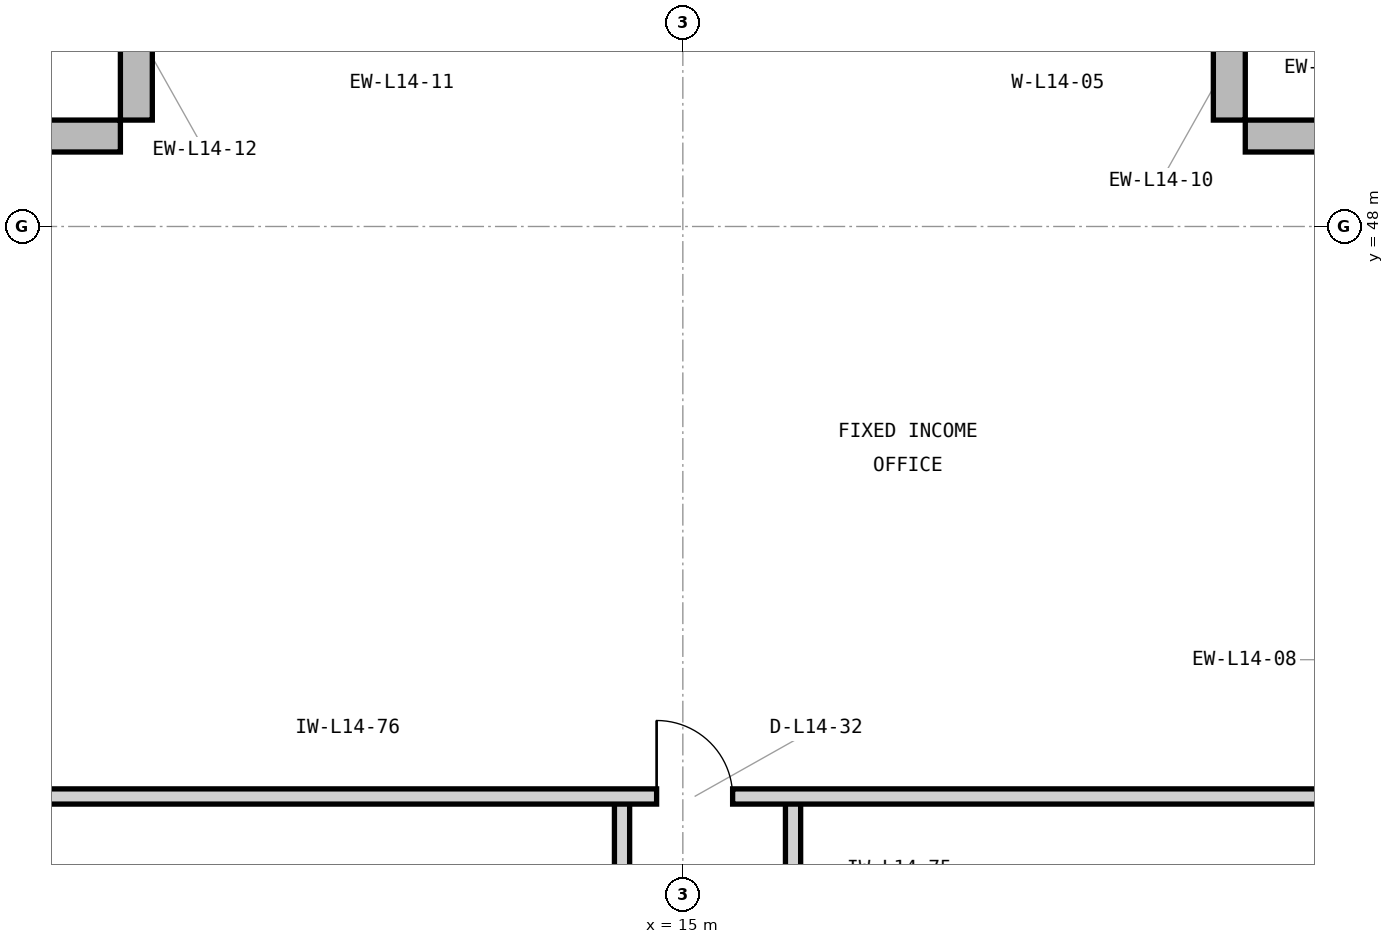
"""IFC4 building model, lengths in metres.
Left out: names, types, materials, properties, quantities, classifications, styles, units other than length and angle.
Written with IfcOpenShell. Run it as: python <this file> out.ifc"""

import sys

from ifc_helpers import new_model, si_unit, direction, frame, frame_2d, origin, place, context, subcontext, project, spatial, rectangle, extrude, element, fill, save


model = new_model("IFC4")
c1 = context("Model", 3, precision=1e-05, world=origin(), true_north=direction((0.0, 1.0)))
c2 = subcontext(c1, "Body", "Model", "MODEL_VIEW")
j1 = project(units=[si_unit("LENGTHUNIT", "METRE"), si_unit("PLANEANGLEUNIT", "RADIAN")], contexts=[c1])
p1 = place(None, origin())
s1 = spatial("IfcSite", under=j1, at=p1, CompositionType="ELEMENT")
p2 = place(p1, origin())
s2 = spatial("IfcBuilding", under=s1, at=p2, CompositionType="ELEMENT")
p3 = place(p2, frame((0.0, 0.0, 63.6)))
s3 = spatial("IfcBuildingStorey", under=s2, at=p3, CompositionType="ELEMENT", Elevation=63.6)
for number, where, z_axis, x_axis in (
    (1, (24.0, 49.19, 0.0), (0.0, 0.0, 1.0), (-1.0, 0.0, 0.0)),
    (2, (22.19, 49.4, 0.0), (0.0, 0.0, 1.0), (0.0, 1.0, 0.0)),
    (3, (7.81, 51.0, 0.0), (0.0, 0.0, 1.0), (0.0, -1.0, 0.0)),
    (4, (7.6, 49.19, 0.0), (0.0, 0.0, 1.0), (-1.0, 0.0, 0.0)),
):
    element("IfcWall", number, at=place(p3, frame(where, z_axis=z_axis, x_axis=x_axis)), inside=s3, PredefinedType="STANDARD", context=c2, shape_type="SweptSolid", body=[
        extrude(rectangle(XDim=1.6, YDim=0.42, at=frame_2d((0.8, 0.0))), origin(), (0.0, 0.0, 1.0), 3.98),
    ])
p4 = place(p3, frame((14.2, 29.18, 0.0), z_axis=(0.0, 0.0, 1.0), x_axis=(0.0, 1.0, 0.0)))
e5 = element("IfcWall", 5, at=p4, inside=s3, PredefinedType="PARTITIONING", context=c2, shape_type="SweptSolid", body=[
    extrude(rectangle(XDim=11.32, YDim=0.2, at=frame_2d((5.66, 0.0))), origin(), (0.0, 0.0, 1.0), 3.97),
])
p5 = place(p4, frame((5.16, 0.0, 0.0)))
e6 = element("IfcOpeningElement", 6, at=p5, cuts=e5, PredefinedType="OPENING", context=c2, shape_type="SweptSolid", body=[
    extrude(rectangle(XDim=1.0, YDim=2.15, at=frame_2d((0.5, 1.075))), frame((0.0, 0.11, 0.0), z_axis=(0.0, -1.0, 0.0), x_axis=(1.0, 0.0, 0.0)), (0.0, 0.0, 1.0), 0.22),
])
p6 = place(p3, frame((16.45, 36.68, 0.0), z_axis=(0.0, 0.0, 1.0), x_axis=(0.0, 1.0, 0.0)))
e7 = element("IfcWall", 7, at=p6, inside=s3, PredefinedType="PARTITIONING", context=c2, shape_type="SweptSolid", body=[
    extrude(rectangle(XDim=3.82, YDim=0.2, at=frame_2d((1.91, 0.0))), origin(), (0.0, 0.0, 1.0), 3.97),
])
p7 = place(p6, frame((1.41, 0.0, 0.0)))
e8 = element("IfcOpeningElement", 8, at=p7, cuts=e7, PredefinedType="OPENING", context=c2, shape_type="SweptSolid", body=[
    extrude(rectangle(XDim=1.0, YDim=2.15, at=frame_2d((0.5, 1.075))), frame((0.0, 0.11, 0.0), z_axis=(0.0, -1.0, 0.0), x_axis=(1.0, 0.0, 0.0)), (0.0, 0.0, 1.0), 0.22),
])
p8 = place(p3, frame((6.18, 40.5, 0.0), z_axis=(0.0, 0.0, 1.0), x_axis=(1.0, 0.0, 0.0)))
e9 = element("IfcWall", 9, at=p8, inside=s3, PredefinedType="PARTITIONING", context=c2, shape_type="SweptSolid", body=[
    extrude(rectangle(XDim=17.64, YDim=0.2, at=frame_2d((8.82, 0.0))), origin(), (0.0, 0.0, 1.0), 3.97),
])
p9 = place(p8, frame((8.475, 0.0, 0.0)))
e10 = element("IfcOpeningElement", 10, at=p9, cuts=e9, PredefinedType="OPENING", context=c2, shape_type="SweptSolid", body=[
    extrude(rectangle(XDim=1.0, YDim=2.15, at=frame_2d((0.5, 1.075))), frame((0.0, 0.11, 0.0), z_axis=(0.0, -1.0, 0.0), x_axis=(1.0, 0.0, 0.0)), (0.0, 0.0, 1.0), 0.22),
])
p10 = place(p9, origin())
e11 = element("IfcDoor", 11, at=p10, inside=s3, OperationType="SINGLE_SWING_LEFT", PredefinedType="DOOR", context=c2, shape_type="SweptSolid", body=[
    extrude(rectangle(XDim=1.0, YDim=2.15, at=frame_2d((0.5, 1.075))), frame((0.0, 0.025, 0.0), z_axis=(0.0, -1.0, 0.0), x_axis=(1.0, 0.0, 0.0)), (0.0, 0.0, 1.0), 0.05),
])
fill(e10, e11)
save(model, sys.argv[1])
